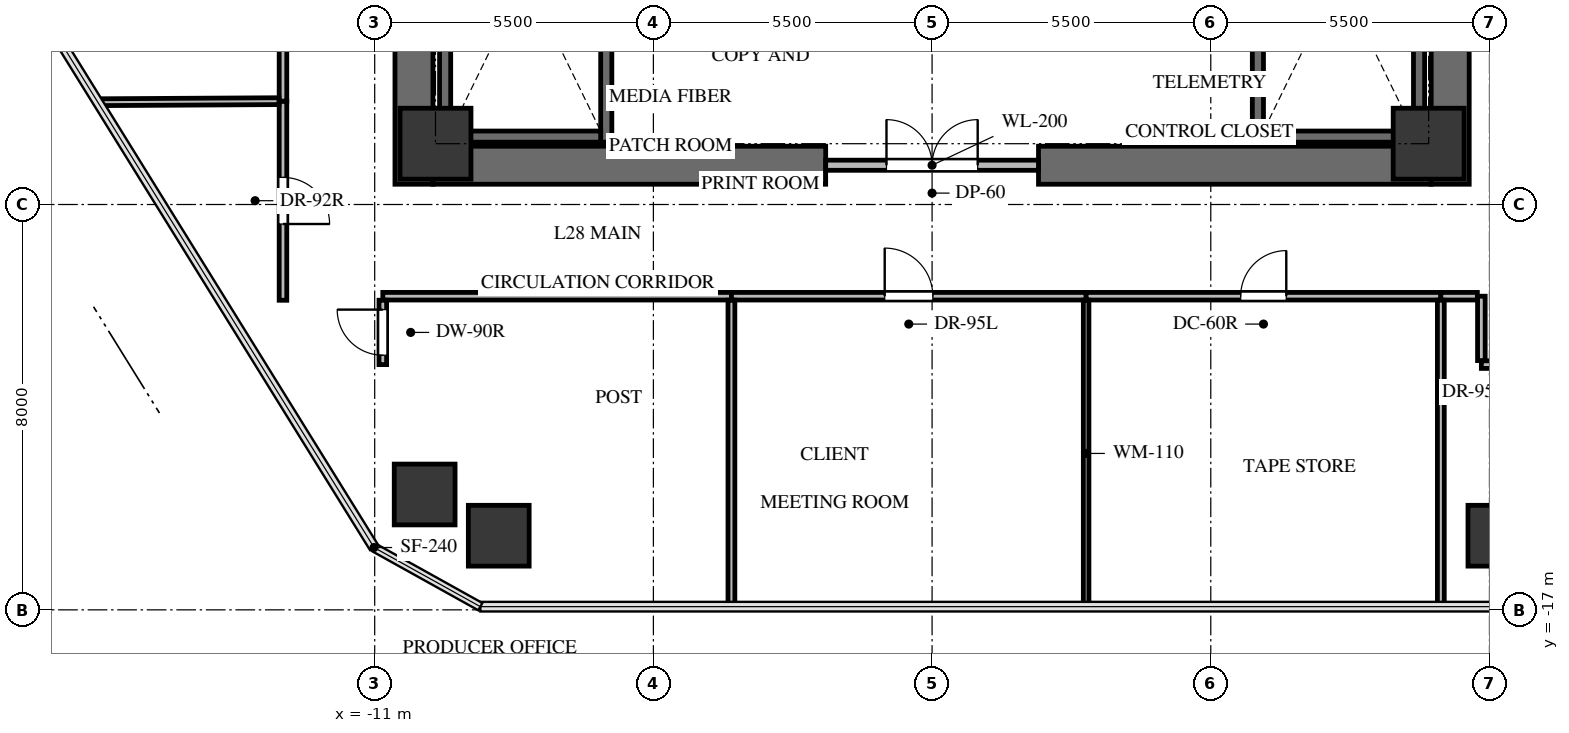
"""IFC4 building model, lengths in metres.
Left out: names, types, materials, properties, quantities, classifications, styles, units other than length and angle.
Written with IfcOpenShell. Run it as: python <this file> out.ifc"""

import sys

from ifc_helpers import new_model, si_unit, direction, frame, frame_2d, origin, origin_2d, place, context, subcontext, project, spatial, rectangle, extrude, source, transform, mapped, element, fill, save


model = new_model("IFC4")
c1 = context("Model", 3, precision=1e-05, world=origin(), true_north=direction((0.0, 1.0)))
c2 = subcontext(c1, "Body", "Model", "MODEL_VIEW")
j1 = project(units=[si_unit("LENGTHUNIT", "METRE"), si_unit("PLANEANGLEUNIT", "RADIAN")], contexts=[c1])
p1 = place(None, origin())
s1 = spatial("IfcSite", under=j1, at=p1, CompositionType="ELEMENT")
p2 = place(p1, origin())
s2 = spatial("IfcBuilding", under=s1, at=p2, CompositionType="ELEMENT")
p3 = place(p2, frame((0.0, 0.0, 107.4)))
s3 = spatial("IfcBuildingStorey", under=s2, at=p3, CompositionType="ELEMENT", Elevation=107.4)
for number, where, z_axis, x_axis in (
    (1, (-10.225, -8.6, 0.0), (0.0, 0.0, 1.0), (0.0, 1.0, 0.0)),
    (2, (10.225, -8.6, 0.0), (0.0, 0.0, 1.0), (0.0, 1.0, 0.0)),
):
    element("IfcWall", number, at=place(p3, frame(where, z_axis=z_axis, x_axis=x_axis)), inside=s3, PredefinedType="SHEAR", context=c2, shape_type="SweptSolid", body=[
        extrude(rectangle(XDim=17.2, YDim=0.75, at=frame_2d((8.6, 0.0))), origin(), (0.0, 0.0, 1.0), 3.3),
    ])
for number, where, z_axis, x_axis in (
    (3, (-9.85, -8.225, 0.0), (0.0, 0.0, 1.0), (1.0, 0.0, 0.0)),
    (4, (2.1, -8.225, 0.0), (0.0, 0.0, 1.0), (1.0, 0.0, 0.0)),
):
    element("IfcWall", number, at=place(p3, frame(where, z_axis=z_axis, x_axis=x_axis)), inside=s3, PredefinedType="SHEAR", context=c2, shape_type="SweptSolid", body=[
        extrude(rectangle(XDim=7.75, YDim=0.75, at=frame_2d((3.875, 0.0))), origin(), (0.0, 0.0, 1.0), 3.3),
    ])
p4 = place(p3, frame((-6.43, -7.77, -0.24), z_axis=(0.0, 0.0, 1.0), x_axis=(0.0, 1.0, 0.0)))
e5 = element("IfcWall", 5, at=p4, inside=s3, PredefinedType="SHEAR", context=c2, shape_type="SweptSolid", body=[
    extrude(rectangle(XDim=7.89, YDim=0.22, at=frame_2d((3.945, 0.0))), origin(), (0.0, 0.0, 1.0), 3.3),
])
p5 = place(p4, frame((6.32, 0.0, 0.0)))
e6 = element("IfcOpeningElement", 6, at=p5, cuts=e5, PredefinedType="OPENING", context=c2, shape_type="SweptSolid", body=[
    extrude(rectangle(XDim=1.05, YDim=2.15, at=frame_2d((0.525, 1.075))), frame((0.0, 0.12, 0.0), z_axis=(0.0, -1.0, 0.0), x_axis=(1.0, 0.0, 0.0)), (0.0, 0.0, 1.0), 0.24),
])
p6 = place(p3, frame((-9.61, 0.12, -0.24), z_axis=(0.0, 0.0, 1.0), x_axis=(0.0, -1.0, 0.0)))
e7 = element("IfcWall", 7, at=p6, inside=s3, PredefinedType="SHEAR", context=c2, shape_type="SweptSolid", body=[
    extrude(rectangle(XDim=7.89, YDim=0.22, at=frame_2d((3.945, 0.0))), origin(), (0.0, 0.0, 1.0), 3.3),
])
p7 = place(p3, frame((-9.5, -7.66, -0.24), z_axis=(0.0, 0.0, 1.0), x_axis=(1.0, 0.0, 0.0)))
e8 = element("IfcWall", 8, at=p7, inside=s3, PredefinedType="SHEAR", context=c2, shape_type="SweptSolid", body=[
    extrude(rectangle(XDim=2.96, YDim=0.22, at=frame_2d((1.48, 0.0))), origin(), (0.0, 0.0, 1.0), 3.3),
])
p8 = place(p3, frame((9.61, -7.77, -0.24), z_axis=(0.0, 0.0, 1.0), x_axis=(0.0, 1.0, 0.0)))
e9 = element("IfcWall", 9, at=p8, inside=s3, PredefinedType="SHEAR", context=c2, shape_type="SweptSolid", body=[
    extrude(rectangle(XDim=7.89, YDim=0.22, at=frame_2d((3.945, 0.0))), origin(), (0.0, 0.0, 1.0), 3.3),
])
p9 = place(p3, frame((6.43, 0.12, -0.24), z_axis=(0.0, 0.0, 1.0), x_axis=(0.0, -1.0, 0.0)))
e10 = element("IfcWall", 10, at=p9, inside=s3, PredefinedType="SHEAR", context=c2, shape_type="SweptSolid", body=[
    extrude(rectangle(XDim=7.89, YDim=0.22, at=frame_2d((3.945, 0.0))), origin(), (0.0, 0.0, 1.0), 3.3),
])
p10 = place(p9, frame((0.52, 0.0, 0.0)))
e11 = element("IfcOpeningElement", 11, at=p10, cuts=e10, PredefinedType="OPENING", context=c2, shape_type="SweptSolid", body=[
    extrude(rectangle(XDim=1.05, YDim=2.15, at=frame_2d((0.525, 1.075))), frame((0.0, 0.12, 0.0), z_axis=(0.0, -1.0, 0.0), x_axis=(1.0, 0.0, 0.0)), (0.0, 0.0, 1.0), 0.24),
])
p11 = place(p3, frame((6.54, -7.66, -0.24), z_axis=(0.0, 0.0, 1.0), x_axis=(1.0, 0.0, 0.0)))
e12 = element("IfcWall", 12, at=p11, inside=s3, PredefinedType="SHEAR", context=c2, shape_type="SweptSolid", body=[
    extrude(rectangle(XDim=2.96, YDim=0.22, at=frame_2d((1.48, 0.0))), origin(), (0.0, 0.0, 1.0), 3.3),
])
m1 = source(origin(), c2, "Body", "SweptSolid", [
    extrude(rectangle(XDim=1.4, YDim=1.4, at=origin_2d()), origin(), (0.0, 0.0, 1.0), 3.3),
])
for number, where, z_axis, x_axis in (
    (13, (-9.8, -7.8, -0.24), (0.0, 0.0, 1.0), (1.0, 0.0, 0.0)),
    (14, (9.8, -7.8, -0.24), (0.0, 0.0, 1.0), (1.0, 0.0, 0.0)),
):
    element("IfcColumn", number, at=place(p3, frame(where, z_axis=z_axis, x_axis=x_axis)), inside=s3, PredefinedType="COLUMN", context=c2, shape_type="MappedRepresentation", body=[
        mapped(m1, transform((0.0, 0.0, 0.0), x_axis=(1.0, 0.0, 0.0), y_axis=(0.0, 1.0, 0.0), z_axis=(0.0, 0.0, 1.0), scale=1.0)),
    ])
m2 = source(origin(), c2, "Body", "SweptSolid", [
    extrude(rectangle(XDim=1.2, YDim=1.2, at=origin_2d()), origin(), (0.0, 0.0, 1.0), 3.3),
])
for number, where, z_axis, x_axis in (
    (15, (-10.014, -14.723, -0.24), (0.0, 0.0, 1.0), (1.0, 0.0, 0.0)),
    (16, (11.176, -15.537, -0.24), (0.0, 0.0, 1.0), (1.0, 0.0, 0.0)),
    (17, (-8.552, -15.537, -0.24), (0.0, 0.0, 1.0), (1.0, 0.0, 0.0)),
):
    element("IfcColumn", number, at=place(p3, frame(where, z_axis=z_axis, x_axis=x_axis)), inside=s3, PredefinedType="COLUMN", context=c2, shape_type="MappedRepresentation", body=[
        mapped(m2, transform((0.0, 0.0, 0.0), x_axis=(1.0, 0.0, 0.0), y_axis=(0.0, 1.0, 0.0), z_axis=(0.0, 0.0, 1.0), scale=1.0)),
    ])
p12 = place(p3, frame((-2.1, -8.225, 0.0), z_axis=(0.0, 0.0, 1.0), x_axis=(1.0, 0.0, 0.0)))
e18 = element("IfcWall", 18, at=p12, inside=s3, PredefinedType="SOLIDWALL", context=c2, shape_type="SweptSolid", body=[
    extrude(rectangle(XDim=4.2, YDim=0.2, at=frame_2d((2.1, 0.0))), origin(), (0.0, 0.0, 1.0), 3.045),
])
p13 = place(p12, frame((1.2, 0.0, 0.0)))
e19 = element("IfcOpeningElement", 19, at=p13, cuts=e18, PredefinedType="OPENING", context=c2, shape_type="SweptSolid", body=[
    extrude(rectangle(XDim=1.8, YDim=2.15, at=frame_2d((0.9, 1.075))), frame((0.0, 0.11, 0.0), z_axis=(0.0, -1.0, 0.0), x_axis=(1.0, 0.0, 0.0)), (0.0, 0.0, 1.0), 0.22),
])
p14 = place(p3, frame((-10.84, -10.81, 0.0), z_axis=(0.0, 0.0, 1.0), x_axis=(1.0, 0.0, 0.0)))
e20 = element("IfcWall", 20, at=p14, inside=s3, PredefinedType="PARTITIONING", context=c2, shape_type="SweptSolid", body=[
    extrude(rectangle(XDim=6.88, YDim=0.15, at=frame_2d((3.44, 0.0))), origin(), (0.0, 0.0, 1.0), 2.212),
])
p15 = place(p3, frame((-10.84, -12.16, 0.0), z_axis=(0.0, 0.0, 1.0), x_axis=(0.0, 1.0, 0.0)))
e21 = element("IfcWall", 21, at=p15, inside=s3, PredefinedType="PARTITIONING", context=c2, shape_type="SweptSolid", body=[
    extrude(rectangle(XDim=1.271, YDim=0.15, at=frame_2d((0.635, 0.0))), origin(), (0.0, 0.0, 1.0), 3.045),
])
p16 = place(p15, frame((0.186, 0.0, 0.0)))
e22 = element("IfcOpeningElement", 22, at=p16, cuts=e21, PredefinedType="OPENING", context=c2, shape_type="SweptSolid", body=[
    extrude(rectangle(XDim=0.9, YDim=2.05, at=frame_2d((0.45, 1.025))), frame((0.0, 0.085, 0.0), z_axis=(0.0, -1.0, 0.0), x_axis=(1.0, 0.0, 0.0)), (0.0, 0.0, 1.0), 0.17),
])
p17 = place(p3, frame((-3.96, -10.81, 0.0), z_axis=(0.0, 0.0, 1.0), x_axis=(1.0, 0.0, 0.0)))
e23 = element("IfcWall", 23, at=p17, inside=s3, PredefinedType="PARTITIONING", context=c2, shape_type="SweptSolid", body=[
    extrude(rectangle(XDim=7.0, YDim=0.15, at=frame_2d((3.5, 0.0))), origin(), (0.0, 0.0, 1.0), 3.045),
])
p18 = place(p17, frame((3.025, 0.0, 0.0)))
e24 = element("IfcOpeningElement", 24, at=p18, cuts=e23, PredefinedType="OPENING", context=c2, shape_type="SweptSolid", body=[
    extrude(rectangle(XDim=0.95, YDim=2.1, at=frame_2d((0.475, 1.05))), frame((0.0, 0.085, 0.0), z_axis=(0.0, -1.0, 0.0), x_axis=(1.0, 0.0, 0.0)), (0.0, 0.0, 1.0), 0.17),
])
p19 = place(p3, frame((3.04, -10.81, 0.0), z_axis=(0.0, 0.0, 1.0), x_axis=(1.0, 0.0, 0.0)))
e25 = element("IfcWall", 25, at=p19, inside=s3, PredefinedType="PARTITIONING", context=c2, shape_type="SweptSolid", body=[
    extrude(rectangle(XDim=7.0, YDim=0.15, at=frame_2d((3.5, 0.0))), origin(), (0.0, 0.0, 1.0), 2.212),
])
p20 = place(p19, frame((3.05, 0.0, 0.0)))
e26 = element("IfcOpeningElement", 26, at=p20, cuts=e25, PredefinedType="OPENING", context=c2, shape_type="SweptSolid", body=[
    extrude(rectangle(XDim=0.9, YDim=2.05, at=frame_2d((0.45, 1.025))), frame((0.0, 0.085, 0.0), z_axis=(0.0, -1.0, 0.0), x_axis=(1.0, 0.0, 0.0)), (0.0, 0.0, 1.0), 0.17),
])
p21 = place(p3, frame((10.84, -12.16, 0.0), z_axis=(0.0, 0.0, 1.0), x_axis=(1.0, 0.0, 0.0)))
e27 = element("IfcWall", 27, at=p21, inside=s3, PredefinedType="PARTITIONING", context=c2, shape_type="SweptSolid", body=[
    extrude(rectangle(XDim=1.97, YDim=0.15, at=frame_2d((0.985, 0.0))), origin(), (0.0, 0.0, 1.0), 3.045),
])
p22 = place(p21, frame((0.51, 0.0, 0.0)))
e28 = element("IfcOpeningElement", 28, at=p22, cuts=e27, PredefinedType="OPENING", context=c2, shape_type="SweptSolid", body=[
    extrude(rectangle(XDim=0.95, YDim=2.1, at=frame_2d((0.475, 1.05))), frame((0.0, 0.085, 0.0), z_axis=(0.0, -1.0, 0.0), x_axis=(1.0, 0.0, 0.0)), (0.0, 0.0, 1.0), 0.17),
])
p23 = place(p3, frame((10.84, -10.81, 0.0), z_axis=(0.0, 0.0, 1.0), x_axis=(0.0, -1.0, 0.0)))
e29 = element("IfcWall", 29, at=p23, inside=s3, PredefinedType="PARTITIONING", context=c2, shape_type="SweptSolid", body=[
    extrude(rectangle(XDim=1.271, YDim=0.15, at=frame_2d((0.635, 0.0))), origin(), (0.0, 0.0, 1.0), 3.045),
])
p24 = place(p3, frame((10.04, -10.81, 0.0), z_axis=(0.0, 0.0, 1.0), x_axis=(1.0, 0.0, 0.0)))
e30 = element("IfcWall", 30, at=p24, inside=s3, PredefinedType="PARTITIONING", context=c2, shape_type="SweptSolid", body=[
    extrude(rectangle(XDim=0.721, YDim=0.15, at=frame_2d((0.36, 0.0))), origin(), (0.0, 0.0, 1.0), 3.045),
])
p25 = place(p3, frame((-12.81, -6.96, 0.0), z_axis=(0.0, 0.0, 1.0), x_axis=(0.0, -1.0, 0.0)))
e31 = element("IfcWall", 31, at=p25, inside=s3, PredefinedType="PARTITIONING", context=c2, shape_type="SweptSolid", body=[
    extrude(rectangle(XDim=3.93, YDim=0.15, at=frame_2d((1.965, 0.0))), origin(), (0.0, 0.0, 1.0), 2.38),
])
p26 = place(p25, frame((1.505, 0.0, 0.0)))
e32 = element("IfcOpeningElement", 32, at=p26, cuts=e31, PredefinedType="OPENING", context=c2, shape_type="SweptSolid", body=[
    extrude(rectangle(XDim=0.92, YDim=2.1, at=frame_2d((0.46, 1.05))), frame((0.0, 0.085, 0.0), z_axis=(0.0, -1.0, 0.0), x_axis=(1.0, 0.0, 0.0)), (0.0, 0.0, 1.0), 0.17),
])
p27 = place(p3, frame((-12.81, -2.46, 0.0), z_axis=(0.0, 0.0, 1.0), x_axis=(0.0, -1.0, 0.0)))
e33 = element("IfcWall", 33, at=p27, inside=s3, PredefinedType="PARTITIONING", context=c2, shape_type="SweptSolid", body=[
    extrude(rectangle(XDim=4.5, YDim=0.15, at=frame_2d((2.25, 0.0))), origin(), (0.0, 0.0, 1.0), 3.045),
])
p28 = place(p27, frame((1.775, 0.0, 0.0)))
e34 = element("IfcOpeningElement", 34, at=p28, cuts=e33, PredefinedType="OPENING", context=c2, shape_type="SweptSolid", body=[
    extrude(rectangle(XDim=0.95, YDim=2.1, at=frame_2d((0.475, 1.05))), frame((0.0, 0.085, 0.0), z_axis=(0.0, -1.0, 0.0), x_axis=(1.0, 0.0, 0.0)), (0.0, 0.0, 1.0), 0.17),
])
p29 = place(p3, frame((-3.96, -10.889, 0.0), z_axis=(0.0, 0.0, 1.0), x_axis=(0.0, -1.0, 0.0)))
e35 = element("IfcWall", 35, at=p29, inside=s3, PredefinedType="PARTITIONING", context=c2, shape_type="SweptSolid", body=[
    extrude(rectangle(XDim=6.048, YDim=0.135, at=frame_2d((3.024, 0.0))), origin(), (0.0, 0.0, 1.0), 2.38),
])
p30 = place(p3, frame((3.04, -10.889, 0.0), z_axis=(0.0, 0.0, 1.0), x_axis=(0.0, -1.0, 0.0)))
e36 = element("IfcWall", 36, at=p30, inside=s3, PredefinedType="MOVABLE", context=c2, shape_type="SweptSolid", body=[
    extrude(rectangle(XDim=6.048, YDim=0.11, at=frame_2d((3.024, 0.0))), origin(), (0.0, 0.0, 1.0), 2.38),
])
p31 = place(p3, frame((10.04, -10.889, 0.0), z_axis=(0.0, 0.0, 1.0), x_axis=(0.0, -1.0, 0.0)))
e37 = element("IfcWall", 37, at=p31, inside=s3, PredefinedType="PARTITIONING", context=c2, shape_type="SweptSolid", body=[
    extrude(rectangle(XDim=6.048, YDim=0.135, at=frame_2d((3.024, 0.0))), origin(), (0.0, 0.0, 1.0), 2.212),
])
p32 = place(p3, frame((-16.464, -6.981, 0.0), z_axis=(0.0, 0.0, 1.0), x_axis=(0.99998315245, 0.005804723619, 0.0)))
e38 = element("IfcWall", 38, at=p32, inside=s3, PredefinedType="PARTITIONING", context=c2, shape_type="SweptSolid", body=[
    extrude(rectangle(XDim=3.575, YDim=0.135, at=frame_2d((1.788, 0.0))), origin(), (0.0, 0.0, 1.0), 2.38),
])
m3 = source(origin(), c2, "Body", "SweptSolid", [
    extrude(rectangle(XDim=1.8, YDim=2.15, at=frame_2d((0.9, 1.075))), frame((0.0, 0.025, 0.0), z_axis=(0.0, -1.0, 0.0), x_axis=(1.0, 0.0, 0.0)), (0.0, 0.0, 1.0), 0.05),
])
p33 = place(p13, origin())
e39 = element("IfcDoor", 39, at=p33, inside=s3, OperationType="DOUBLE_DOOR_SINGLE_SWING", PredefinedType="DOOR", context=c2, shape_type="MappedRepresentation", body=[
    mapped(m3, transform((0.0, 0.0, 0.0), x_axis=(1.0, 0.0, 0.0), y_axis=(0.0, 1.0, 0.0), z_axis=(0.0, 0.0, 1.0), scale=1.0)),
])
fill(e19, e39)
m4 = source(origin(), c2, "Body", "SweptSolid", [
    extrude(rectangle(XDim=0.9, YDim=2.05, at=frame_2d((0.45, 1.025))), frame((0.0, 0.025, 0.0), z_axis=(0.0, -1.0, 0.0), x_axis=(1.0, 0.0, 0.0)), (0.0, 0.0, 1.0), 0.05),
])
p34 = place(p16, origin())
e40 = element("IfcDoor", 40, at=p34, inside=s3, OperationType="SINGLE_SWING_RIGHT", PredefinedType="DOOR", context=c2, shape_type="MappedRepresentation", body=[
    mapped(m4, transform((0.0, 0.0, 0.0), x_axis=(1.0, 0.0, 0.0), y_axis=(0.0, 1.0, 0.0), z_axis=(0.0, 0.0, 1.0), scale=1.0)),
])
fill(e22, e40)
m5 = source(origin(), c2, "Body", "SweptSolid", [
    extrude(rectangle(XDim=0.95, YDim=2.1, at=frame_2d((0.475, 1.05))), frame((0.0, 0.025, 0.0), z_axis=(0.0, -1.0, 0.0), x_axis=(1.0, 0.0, 0.0)), (0.0, 0.0, 1.0), 0.05),
])
p35 = place(p18, origin())
e41 = element("IfcDoor", 41, at=p35, inside=s3, OperationType="SINGLE_SWING_LEFT", PredefinedType="DOOR", context=c2, shape_type="MappedRepresentation", body=[
    mapped(m5, transform((0.0, 0.0, 0.0), x_axis=(1.0, 0.0, 0.0), y_axis=(0.0, 1.0, 0.0), z_axis=(0.0, 0.0, 1.0), scale=1.0)),
])
fill(e24, e41)
m6 = source(origin(), c2, "Body", "SweptSolid", [
    extrude(rectangle(XDim=0.9, YDim=2.05, at=frame_2d((0.45, 1.025))), frame((0.0, 0.025, 0.0), z_axis=(0.0, -1.0, 0.0), x_axis=(1.0, 0.0, 0.0)), (0.0, 0.0, 1.0), 0.05),
])
p36 = place(p20, origin())
e42 = element("IfcDoor", 42, at=p36, inside=s3, OperationType="SINGLE_SWING_RIGHT", PredefinedType="DOOR", context=c2, shape_type="MappedRepresentation", body=[
    mapped(m6, transform((0.0, 0.0, 0.0), x_axis=(1.0, 0.0, 0.0), y_axis=(0.0, 1.0, 0.0), z_axis=(0.0, 0.0, 1.0), scale=1.0)),
])
fill(e26, e42)
m7 = source(origin(), c2, "Body", "SweptSolid", [
    extrude(rectangle(XDim=0.92, YDim=2.1, at=frame_2d((0.46, 1.05))), frame((0.0, 0.025, 0.0), z_axis=(0.0, -1.0, 0.0), x_axis=(1.0, 0.0, 0.0)), (0.0, 0.0, 1.0), 0.05),
])
p37 = place(p26, origin())
e43 = element("IfcDoor", 43, at=p37, inside=s3, OperationType="SINGLE_SWING_RIGHT", PredefinedType="DOOR", context=c2, shape_type="MappedRepresentation", body=[
    mapped(m7, transform((0.0, 0.0, 0.0), x_axis=(1.0, 0.0, 0.0), y_axis=(0.0, 1.0, 0.0), z_axis=(0.0, 0.0, 1.0), scale=1.0)),
])
fill(e32, e43)
save(model, sys.argv[1])
